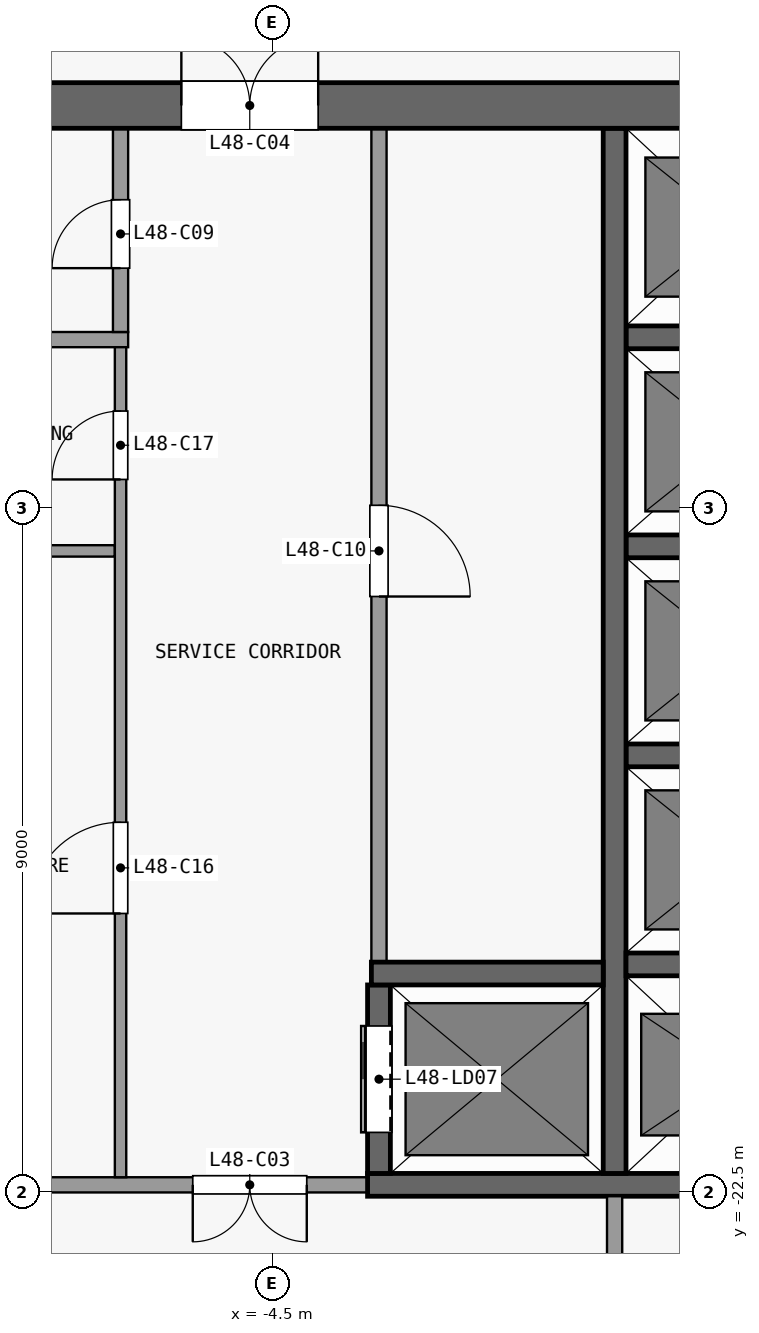
"""IFC4 building model, lengths in metres.
Left out: names, types, materials, properties, quantities, classifications, styles, units other than length and angle.
Written with IfcOpenShell. Run it as: python <this file> out.ifc"""

import sys

from ifc_helpers import new_model, si_unit, direction, frame, frame_2d, origin, place, context, subcontext, project, spatial, rectangle, extrude, element, fill, save


model = new_model("IFC4")
c1 = context("Model", 3, precision=1e-05, world=origin(), true_north=direction((0.0, 1.0)))
c2 = subcontext(c1, "Body", "Model", "MODEL_VIEW")
j1 = project(units=[si_unit("LENGTHUNIT", "METRE"), si_unit("PLANEANGLEUNIT", "RADIAN")], contexts=[c1])
p1 = place(None, origin())
s1 = spatial("IfcSite", under=j1, at=p1, CompositionType="ELEMENT")
p2 = place(p1, origin())
s2 = spatial("IfcBuilding", under=s1, at=p2, CompositionType="ELEMENT")
p3 = place(p2, frame((0.0, 0.0, 192.5)))
s3 = spatial("IfcBuildingStorey", under=s2, at=p3, CompositionType="ELEMENT", Elevation=192.5)
p4 = place(p3, frame((-13.3, -8.2, 0.0), z_axis=(0.0, 0.0, 1.0), x_axis=(1.0, 0.0, 0.0)))
e1 = element("IfcWall", 1, at=p4, inside=s3, PredefinedType="SHEAR", context=c2, shape_type="SweptSolid", body=[
    extrude(rectangle(XDim=26.6, YDim=0.6, at=frame_2d((13.3, 0.0))), origin(), (0.0, 0.0, 1.0), 3.3),
])
p5 = place(p4, frame((7.6, 0.0, 0.0)))
e2 = element("IfcOpeningElement", 2, at=p5, cuts=e1, PredefinedType="OPENING", context=c2, shape_type="SweptSolid", body=[
    extrude(rectangle(XDim=1.8, YDim=2.1, at=frame_2d((0.9, 1.05))), frame((0.0, 0.31, 0.0), z_axis=(0.0, -1.0, 0.0), x_axis=(1.0, 0.0, 0.0)), (0.0, 0.0, 1.0), 0.62),
])
p6 = place(p4, frame((17.2, 0.0, 0.0)))
e3 = element("IfcOpeningElement", 3, at=p6, cuts=e1, PredefinedType="OPENING", context=c2, shape_type="SweptSolid", body=[
    extrude(rectangle(XDim=1.8, YDim=2.1, at=frame_2d((0.9, 1.05))), frame((0.0, 0.31, 0.0), z_axis=(0.0, -1.0, 0.0), x_axis=(1.0, 0.0, 0.0)), (0.0, 0.0, 1.0), 0.62),
])
p7 = place(p4, frame((2.525, 0.0, 0.0)))
e4 = element("IfcOpeningElement", 4, at=p7, cuts=e1, PredefinedType="OPENING", context=c2, shape_type="SweptSolid", body=[
    extrude(rectangle(XDim=0.9, YDim=2.1, at=frame_2d((0.45, 1.05))), frame((0.0, 0.31, 0.0), z_axis=(0.0, -1.0, 0.0), x_axis=(1.0, 0.0, 0.0)), (0.0, 0.0, 1.0), 0.62),
])
p8 = place(p4, frame((23.175, 0.0, 0.0)))
e5 = element("IfcOpeningElement", 5, at=p8, cuts=e1, PredefinedType="OPENING", context=c2, shape_type="SweptSolid", body=[
    extrude(rectangle(XDim=0.9, YDim=2.1, at=frame_2d((0.45, 1.05))), frame((0.0, 0.31, 0.0), z_axis=(0.0, -1.0, 0.0), x_axis=(1.0, 0.0, 0.0)), (0.0, 0.0, 1.0), 0.62),
])
p9 = place(p3, frame((-3.25, -22.4, 0.0), z_axis=(0.0, 0.0, 1.0), x_axis=(-1.0, 0.0, 0.0)))
e6 = element("IfcWall", 6, at=p9, inside=s3, PredefinedType="PARTITIONING", context=c2, shape_type="SweptSolid", body=[
    extrude(rectangle(XDim=6.2, YDim=0.2, at=frame_2d((3.1, 0.0))), origin(), (0.0, 0.0, 1.0), 3.3),
])
p10 = place(p9, frame((0.8, 0.0, 0.0)))
e7 = element("IfcOpeningElement", 7, at=p10, cuts=e6, PredefinedType="OPENING", context=c2, shape_type="SweptSolid", body=[
    extrude(rectangle(XDim=1.5, YDim=2.1, at=frame_2d((0.75, 1.05))), frame((0.0, 0.11, 0.0), z_axis=(0.0, -1.0, 0.0), x_axis=(1.0, 0.0, 0.0)), (0.0, 0.0, 1.0), 0.22),
])
p11 = place(p3, frame((-3.25, -22.4, 0.0), z_axis=(0.0, 0.0, 1.0), x_axis=(1.0, 0.0, 0.0)))
e8 = element("IfcWall", 8, at=p11, inside=s3, PredefinedType="SHEAR", context=c2, shape_type="SweptSolid", body=[
    extrude(rectangle(XDim=6.2, YDim=0.3, at=frame_2d((3.1, 0.0))), origin(), (0.0, 0.0, 1.0), 3.3),
])
p12 = place(p3, frame((-3.2, -19.62, 0.0), z_axis=(0.0, 0.0, 1.0), x_axis=(1.0, 0.0, 0.0)))
e9 = element("IfcWall", 9, at=p12, inside=s3, PredefinedType="SHEAR", context=c2, shape_type="SweptSolid", body=[
    extrude(rectangle(XDim=3.05, YDim=0.3, at=frame_2d((1.525, 0.0))), origin(), (0.0, 0.0, 1.0), 3.3),
])
for number, where, z_axis, x_axis in (
    (10, (0.15, -19.5, 0.0), (0.0, 0.0, 1.0), (1.0, 0.0, 0.0)),
    (11, (0.15, -16.75, 0.0), (0.0, 0.0, 1.0), (1.0, 0.0, 0.0)),
):
    element("IfcWall", number, at=place(p3, frame(where, z_axis=z_axis, x_axis=x_axis)), inside=s3, PredefinedType="SHEAR", context=c2, shape_type="SweptSolid", body=[
        extrude(rectangle(XDim=2.8, YDim=0.3, at=frame_2d((1.4, 0.0))), origin(), (0.0, 0.0, 1.0), 3.3),
    ])
p13 = place(p3, frame((-9.5, -14.06, 0.0), z_axis=(0.0, 0.0, 1.0), x_axis=(1.0, 0.0, 0.0)))
e12 = element("IfcWall", 12, at=p13, inside=s3, PredefinedType="PARTITIONING", context=c2, shape_type="SweptSolid", body=[
    extrude(rectangle(XDim=2.925, YDim=0.15, at=frame_2d((1.462, 0.0))), origin(), (0.0, 0.0, 1.0), 3.3),
])
p14 = place(p3, frame((0.15, -14.0, 0.0), z_axis=(0.0, 0.0, 1.0), x_axis=(1.0, 0.0, 0.0)))
e13 = element("IfcWall", 13, at=p14, inside=s3, PredefinedType="SHEAR", context=c2, shape_type="SweptSolid", body=[
    extrude(rectangle(XDim=2.8, YDim=0.3, at=frame_2d((1.4, 0.0))), origin(), (0.0, 0.0, 1.0), 3.3),
])
p15 = place(p3, frame((-9.7, -11.28, 0.0), z_axis=(0.0, 0.0, 1.0), x_axis=(1.0, 0.0, 0.0)))
e14 = element("IfcWall", 14, at=p15, inside=s3, PredefinedType="PARTITIONING", context=c2, shape_type="SweptSolid", body=[
    extrude(rectangle(XDim=3.3, YDim=0.2, at=frame_2d((1.65, 0.0))), origin(), (0.0, 0.0, 1.0), 3.3),
])
p16 = place(p3, frame((0.15, -11.25, 0.0), z_axis=(0.0, 0.0, 1.0), x_axis=(1.0, 0.0, 0.0)))
e15 = element("IfcWall", 15, at=p16, inside=s3, PredefinedType="SHEAR", context=c2, shape_type="SweptSolid", body=[
    extrude(rectangle(XDim=2.8, YDim=0.3, at=frame_2d((1.4, 0.0))), origin(), (0.0, 0.0, 1.0), 3.3),
])
p17 = place(p3, frame((-6.5, -22.3, 0.0), z_axis=(0.0, 0.0, 1.0), x_axis=(0.0, 1.0, 0.0)))
e16 = element("IfcWall", 16, at=p17, inside=s3, PredefinedType="PARTITIONING", context=c2, shape_type="SweptSolid", body=[
    extrude(rectangle(XDim=10.92, YDim=0.15, at=frame_2d((5.46, 0.0))), origin(), (0.0, 0.0, 1.0), 3.3),
])
p18 = place(p17, frame((3.47, 0.0, 0.0)))
e17 = element("IfcOpeningElement", 17, at=p18, cuts=e16, PredefinedType="OPENING", context=c2, shape_type="SweptSolid", body=[
    extrude(rectangle(XDim=1.2, YDim=2.1, at=frame_2d((0.6, 1.05))), frame((0.0, 0.085, 0.0), z_axis=(0.0, -1.0, 0.0), x_axis=(1.0, 0.0, 0.0)), (0.0, 0.0, 1.0), 0.17),
])
p19 = place(p17, frame((9.18, 0.0, 0.0)))
e18 = element("IfcOpeningElement", 18, at=p19, cuts=e16, PredefinedType="OPENING", context=c2, shape_type="SweptSolid", body=[
    extrude(rectangle(XDim=0.9, YDim=2.1, at=frame_2d((0.45, 1.05))), frame((0.0, 0.085, 0.0), z_axis=(0.0, -1.0, 0.0), x_axis=(1.0, 0.0, 0.0)), (0.0, 0.0, 1.0), 0.17),
])
p20 = place(p3, frame((-6.5, -11.18, 0.0), z_axis=(0.0, 0.0, 1.0), x_axis=(0.0, 1.0, 0.0)))
e19 = element("IfcWall", 19, at=p20, inside=s3, PredefinedType="PARTITIONING", context=c2, shape_type="SweptSolid", body=[
    extrude(rectangle(XDim=2.68, YDim=0.2, at=frame_2d((1.34, 0.0))), origin(), (0.0, 0.0, 1.0), 3.3),
])
p21 = place(p20, frame((0.84, 0.0, 0.0)))
e20 = element("IfcOpeningElement", 20, at=p21, cuts=e19, PredefinedType="OPENING", context=c2, shape_type="SweptSolid", body=[
    extrude(rectangle(XDim=0.9, YDim=2.1, at=frame_2d((0.45, 1.05))), frame((0.0, 0.11, 0.0), z_axis=(0.0, -1.0, 0.0), x_axis=(1.0, 0.0, 0.0)), (0.0, 0.0, 1.0), 0.22),
])
p22 = place(p3, frame((-3.1, -22.25, 0.0), z_axis=(0.0, 0.0, 1.0), x_axis=(0.0, 1.0, 0.0)))
e21 = element("IfcWall", 21, at=p22, inside=s3, PredefinedType="SHEAR", context=c2, shape_type="SweptSolid", body=[
    extrude(rectangle(XDim=2.48, YDim=0.3, at=frame_2d((1.24, 0.0))), origin(), (0.0, 0.0, 1.0), 3.3),
])
p23 = place(p22, frame((0.54, 0.0, 0.0)))
e22 = element("IfcOpeningElement", 22, at=p23, cuts=e21, PredefinedType="OPENING", context=c2, shape_type="SweptSolid", body=[
    extrude(rectangle(XDim=1.4, YDim=2.1, at=frame_2d((0.7, 1.05))), frame((0.0, 0.16, 0.0), z_axis=(0.0, -1.0, 0.0), x_axis=(1.0, 0.0, 0.0)), (0.0, 0.0, 1.0), 0.32),
])
p24 = place(p3, frame((-3.1, -8.5, 0.0), z_axis=(0.0, 0.0, 1.0), x_axis=(0.0, -1.0, 0.0)))
e23 = element("IfcWall", 23, at=p24, inside=s3, PredefinedType="PARTITIONING", context=c2, shape_type="SweptSolid", body=[
    extrude(rectangle(XDim=10.97, YDim=0.2, at=frame_2d((5.485, 0.0))), origin(), (0.0, 0.0, 1.0), 3.3),
])
p25 = place(p24, frame((4.96, 0.0, 0.0)))
e24 = element("IfcOpeningElement", 24, at=p25, cuts=e23, PredefinedType="OPENING", context=c2, shape_type="SweptSolid", body=[
    extrude(rectangle(XDim=1.2, YDim=2.1, at=frame_2d((0.6, 1.05))), frame((0.0, 0.11, 0.0), z_axis=(0.0, -1.0, 0.0), x_axis=(1.0, 0.0, 0.0)), (0.0, 0.0, 1.0), 0.22),
])
p26 = place(p3, frame((0.0, -24.6, 0.0), z_axis=(0.0, 0.0, 1.0), x_axis=(0.0, 1.0, 0.0)))
e25 = element("IfcWall", 25, at=p26, inside=s3, PredefinedType="PARTITIONING", context=c2, shape_type="SweptSolid", body=[
    extrude(rectangle(XDim=2.05, YDim=0.2, at=frame_2d((1.025, 0.0))), origin(), (0.0, 0.0, 1.0), 3.3),
])
p27 = place(p3, frame((0.0, -22.25, 0.0), z_axis=(0.0, 0.0, 1.0), x_axis=(0.0, 1.0, 0.0)))
e26 = element("IfcWall", 26, at=p27, inside=s3, PredefinedType="SHEAR", context=c2, shape_type="SweptSolid", body=[
    extrude(rectangle(XDim=13.75, YDim=0.3, at=frame_2d((6.875, 0.0))), origin(), (0.0, 0.0, 1.0), 3.3),
])
p28 = place(p23, origin())
e27 = element("IfcDoor", 27, at=p28, inside=s3, OperationType="DOUBLE_DOOR_SLIDING", PredefinedType="DOOR", context=c2, shape_type="SweptSolid", body=[
    extrude(rectangle(XDim=1.4, YDim=2.1, at=frame_2d((0.7, 1.05))), frame((0.0, 0.025, 0.0), z_axis=(0.0, -1.0, 0.0), x_axis=(1.0, 0.0, 0.0)), (0.0, 0.0, 1.0), 0.05),
])
fill(e22, e27)
p29 = place(p10, origin())
e28 = element("IfcDoor", 28, at=p29, inside=s3, OperationType="DOUBLE_DOOR_SINGLE_SWING", PredefinedType="DOOR", context=c2, shape_type="SweptSolid", body=[
    extrude(rectangle(XDim=1.5, YDim=2.1, at=frame_2d((0.75, 1.05))), frame((0.0, 0.025, 0.0), z_axis=(0.0, -1.0, 0.0), x_axis=(1.0, 0.0, 0.0)), (0.0, 0.0, 1.0), 0.05),
])
fill(e7, e28)
p30 = place(p5, origin())
e29 = element("IfcDoor", 29, at=p30, inside=s3, OperationType="DOUBLE_DOOR_SINGLE_SWING", PredefinedType="DOOR", context=c2, shape_type="SweptSolid", body=[
    extrude(rectangle(XDim=1.8, YDim=2.1, at=frame_2d((0.9, 1.05))), frame((0.0, 0.025, 0.0), z_axis=(0.0, -1.0, 0.0), x_axis=(1.0, 0.0, 0.0)), (0.0, 0.0, 1.0), 0.05),
])
fill(e2, e29)
p31 = place(p21, origin())
e30 = element("IfcDoor", 30, at=p31, inside=s3, OperationType="SINGLE_SWING_LEFT", PredefinedType="DOOR", context=c2, shape_type="SweptSolid", body=[
    extrude(rectangle(XDim=0.9, YDim=2.1, at=frame_2d((0.45, 1.05))), frame((0.0, 0.025, 0.0), z_axis=(0.0, -1.0, 0.0), x_axis=(1.0, 0.0, 0.0)), (0.0, 0.0, 1.0), 0.05),
])
fill(e20, e30)
p32 = place(p25, origin())
e31 = element("IfcDoor", 31, at=p32, inside=s3, OperationType="SINGLE_SWING_RIGHT", PredefinedType="DOOR", context=c2, shape_type="SweptSolid", body=[
    extrude(rectangle(XDim=1.2, YDim=2.1, at=frame_2d((0.6, 1.05))), frame((0.0, 0.025, 0.0), z_axis=(0.0, -1.0, 0.0), x_axis=(1.0, 0.0, 0.0)), (0.0, 0.0, 1.0), 0.05),
])
fill(e24, e31)
p33 = place(p18, origin())
e32 = element("IfcDoor", 32, at=p33, inside=s3, OperationType="SINGLE_SWING_LEFT", PredefinedType="DOOR", context=c2, shape_type="SweptSolid", body=[
    extrude(rectangle(XDim=1.2, YDim=2.1, at=frame_2d((0.6, 1.05))), frame((0.0, 0.025, 0.0), z_axis=(0.0, -1.0, 0.0), x_axis=(1.0, 0.0, 0.0)), (0.0, 0.0, 1.0), 0.05),
])
fill(e17, e32)
p34 = place(p19, origin())
e33 = element("IfcDoor", 33, at=p34, inside=s3, OperationType="SINGLE_SWING_LEFT", PredefinedType="DOOR", context=c2, shape_type="SweptSolid", body=[
    extrude(rectangle(XDim=0.9, YDim=2.1, at=frame_2d((0.45, 1.05))), frame((0.0, 0.025, 0.0), z_axis=(0.0, -1.0, 0.0), x_axis=(1.0, 0.0, 0.0)), (0.0, 0.0, 1.0), 0.05),
])
fill(e18, e33)
save(model, sys.argv[1])
